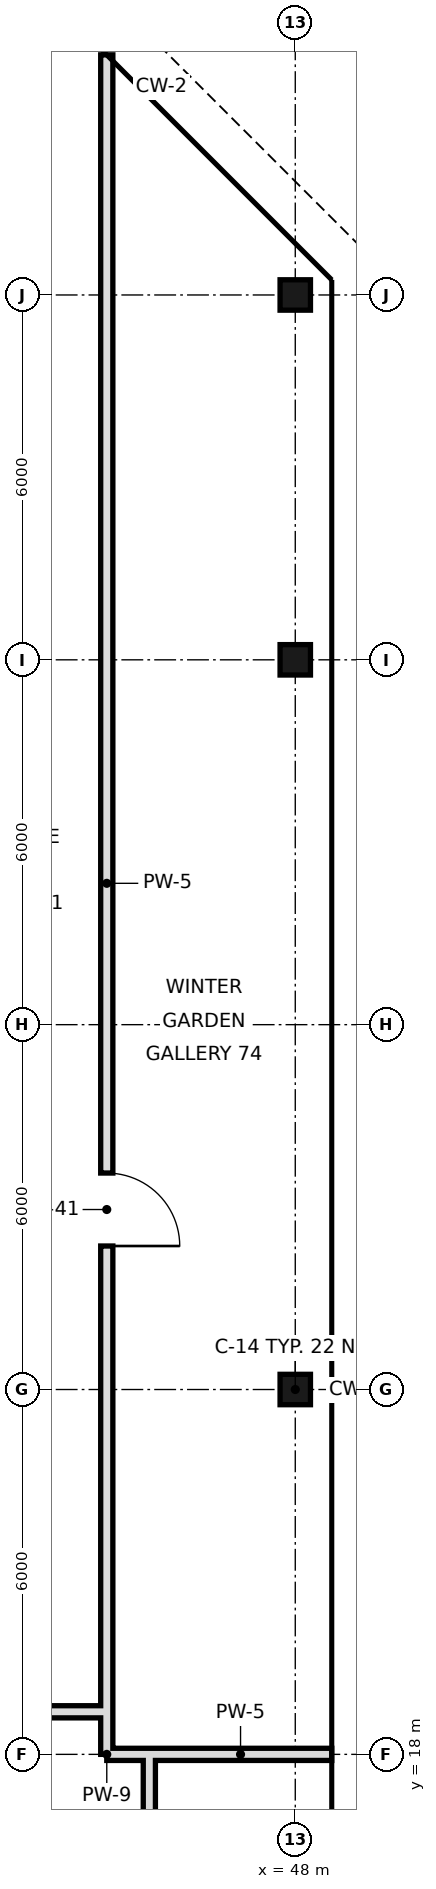
"""IFC4 building model, lengths in metres.
Left out: names, types, materials, properties, quantities, classifications, styles, units other than length and angle.
Written with IfcOpenShell. Run it as: python <this file> out.ifc"""

import sys

from ifc_helpers import new_model, si_unit, direction, frame, frame_2d, origin, origin_2d, place, context, subcontext, project, spatial, rectangle, hollow_rectangle, extrude, element, fill, save


model = new_model("IFC4")
c1 = context("Model", 3, precision=1e-05, world=origin(), true_north=direction((0.0, 1.0)))
c2 = subcontext(c1, "Body", "Model", "MODEL_VIEW")
j1 = project(units=[si_unit("LENGTHUNIT", "METRE"), si_unit("PLANEANGLEUNIT", "RADIAN")], contexts=[c1])
p1 = place(None, origin())
s1 = spatial("IfcSite", under=j1, at=p1, CompositionType="ELEMENT")
p2 = place(p1, origin())
s2 = spatial("IfcBuilding", under=s1, at=p2, CompositionType="ELEMENT")
p3 = place(p2, frame((0.0, 0.0, 312.4)))
s3 = spatial("IfcBuildingStorey", under=s2, at=p3, CompositionType="ELEMENT", Elevation=312.4)
for number, where, z_axis, x_axis in (
    (1, (48.0, 24.0, 0.0), (0.0, 0.0, 1.0), (1.0, 0.0, 0.0)),
    (2, (48.0, 36.0, 0.0), (0.0, 0.0, 1.0), (1.0, 0.0, 0.0)),
    (3, (48.0, 42.0, 0.0), (0.0, 0.0, 1.0), (1.0, 0.0, 0.0)),
):
    element("IfcColumn", number, at=place(p3, frame(where, z_axis=z_axis, x_axis=x_axis)), inside=s3, PredefinedType="COLUMN", context=c2, shape_type="SweptSolid", body=[
        extrude(hollow_rectangle(XDim=0.5, YDim=0.5, WallThickness=0.025, at=origin_2d()), origin(), (0.0, 0.0, 1.0), 3.6),
    ])
p4 = place(p3, frame((44.9, 18.7, 0.0), z_axis=(0.0, 0.0, 1.0), x_axis=(0.0, 1.0, 0.0)))
e4 = element("IfcWall", 4, at=p4, inside=s3, PredefinedType="SOLIDWALL", context=c2, shape_type="SweptSolid", body=[
    extrude(rectangle(XDim=27.249, YDim=0.2, at=frame_2d((13.625, 0.0))), origin(), (0.0, 0.0, 1.0), 2.97),
])
p5 = place(p4, frame((7.66, 0.0, 0.0)))
e5 = element("IfcOpeningElement", 5, at=p5, cuts=e4, PredefinedType="OPENING", context=c2, shape_type="SweptSolid", body=[
    extrude(rectangle(XDim=1.2, YDim=2.4, at=frame_2d((0.6, 1.2))), frame((0.0, 0.11, 0.0), z_axis=(0.0, -1.0, 0.0), x_axis=(1.0, 0.0, 0.0)), (0.0, 0.0, 1.0), 0.22),
])
p6 = place(p3, frame((44.9, 18.0, 0.0), z_axis=(0.0, 0.0, 1.0), x_axis=(0.0, 1.0, 0.0)))
e6 = element("IfcWall", 6, at=p6, inside=s3, PredefinedType="SOLIDWALL", context=c2, shape_type="SweptSolid", body=[
    extrude(rectangle(XDim=0.7, YDim=0.2, at=frame_2d((0.35, 0.0))), origin(), (0.0, 0.0, 1.0), 2.97),
])
p7 = place(p3, frame((45.6, 10.8, 0.0), z_axis=(0.0, 0.0, 1.0), x_axis=(0.0, 1.0, 0.0)))
e7 = element("IfcWall", 7, at=p7, inside=s3, PredefinedType="SOLIDWALL", context=c2, shape_type="SweptSolid", body=[
    extrude(rectangle(XDim=7.2, YDim=0.2, at=frame_2d((3.6, 0.0))), origin(), (0.0, 0.0, 1.0), 2.72),
])
p8 = place(p3, frame((45.6, 18.0, 0.0), z_axis=(0.0, 0.0, 1.0), x_axis=(1.0, 0.0, 0.0)))
e8 = element("IfcWall", 8, at=p8, inside=s3, PredefinedType="SOLIDWALL", context=c2, shape_type="SweptSolid", body=[
    extrude(rectangle(XDim=3.0, YDim=0.2, at=frame_2d((1.5, 0.0))), origin(), (0.0, 0.0, 1.0), 2.72),
])
p9 = place(p3, frame((44.9, 18.0, 0.0), z_axis=(0.0, 0.0, 1.0), x_axis=(1.0, 0.0, 0.0)))
e9 = element("IfcWall", 9, at=p9, inside=s3, PredefinedType="SOLIDWALL", context=c2, shape_type="SweptSolid", body=[
    extrude(rectangle(XDim=0.7, YDim=0.2, at=frame_2d((0.35, 0.0))), origin(), (0.0, 0.0, 1.0), 2.97),
])
p10 = place(p3, frame((40.2, 18.7, 0.0), z_axis=(0.0, 0.0, 1.0), x_axis=(1.0, 0.0, 0.0)))
e10 = element("IfcWall", 10, at=p10, inside=s3, PredefinedType="SOLIDWALL", context=c2, shape_type="SweptSolid", body=[
    extrude(rectangle(XDim=4.7, YDim=0.2, at=frame_2d((2.35, 0.0))), origin(), (0.0, 0.0, 1.0), 2.72),
])
p11 = place(p5, frame((1.2, 0.0, 0.0), z_axis=(0.0, 0.0, 1.0), x_axis=(-1.0, 0.0, 0.0)))
e11 = element("IfcDoor", 11, at=p11, inside=s3, OperationType="SINGLE_SWING_RIGHT", PredefinedType="DOOR", context=c2, shape_type="SweptSolid", body=[
    extrude(rectangle(XDim=1.2, YDim=2.4, at=frame_2d((0.6, 1.2))), frame((0.0, 0.025, 0.0), z_axis=(0.0, -1.0, 0.0), x_axis=(1.0, 0.0, 0.0)), (0.0, 0.0, 1.0), 0.05),
])
fill(e5, e11)
save(model, sys.argv[1])
